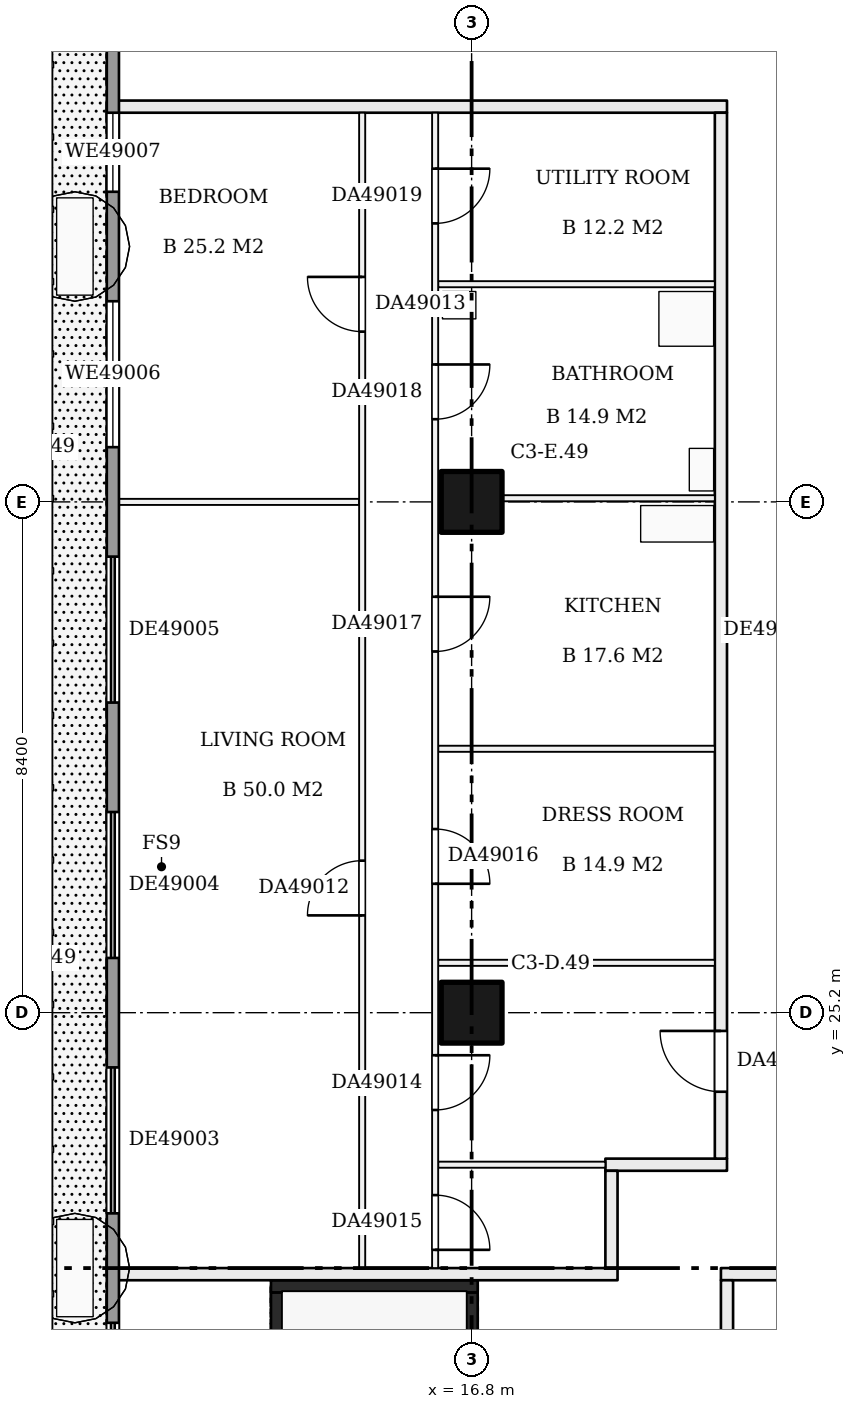
"""IFC4 building model, lengths in metres.
Left out: names, types, materials, properties, quantities, classifications, styles, units other than length and angle.
Written with IfcOpenShell. Run it as: python <this file> out.ifc"""

import sys

from ifc_helpers import new_model, si_unit, direction, frame, frame_2d, origin, origin_2d, place, context, subcontext, project, spatial, rectangle, extrude, element, fill, save


model = new_model("IFC4")
c1 = context("Model", 3, precision=1e-05, world=origin(), true_north=direction((0.0, 1.0)))
c2 = subcontext(c1, "Body", "Model", "MODEL_VIEW")
j1 = project(units=[si_unit("LENGTHUNIT", "METRE"), si_unit("PLANEANGLEUNIT", "RADIAN")], contexts=[c1])
p1 = place(None, origin())
s1 = spatial("IfcSite", under=j1, at=p1, CompositionType="ELEMENT")
p2 = place(p1, origin())
s2 = spatial("IfcBuilding", under=s1, at=p2, CompositionType="ELEMENT")
p3 = place(p2, frame((0.0, 0.0, 189.7)))
s3 = spatial("IfcBuildingStorey", under=s2, at=p3, CompositionType="ELEMENT", Elevation=189.7)
for number, where, z_axis, x_axis in (
    (1, (16.8, 25.2, 0.0), (0.0, 0.0, 1.0), (1.0, 0.0, 0.0)),
    (2, (16.8, 33.6, 0.0), (0.0, 0.0, 1.0), (1.0, 0.0, 0.0)),
):
    element("IfcColumn", number, at=place(p3, frame(where, z_axis=z_axis, x_axis=x_axis)), inside=s3, PredefinedType="COLUMN", context=c2, shape_type="SweptSolid", body=[
        extrude(rectangle(XDim=1.0, YDim=1.0, at=origin_2d()), origin(), (0.0, 0.0, 1.0), 3.22),
    ])
p4 = place(p3, frame((13.6, 13.8, 0.0), z_axis=(0.0, 0.0, 1.0), x_axis=(0.0, 1.0, 0.0)))
e3 = element("IfcWall", 3, at=p4, inside=s3, PredefinedType="SHEAR", context=c2, shape_type="SweptSolid", body=[
    extrude(rectangle(XDim=6.8, YDim=0.2, at=frame_2d((3.4, 0.0))), origin(), (0.0, 0.0, 1.0), 3.22),
])
p5 = place(p3, frame((16.8, 13.8, 0.0), z_axis=(0.0, 0.0, 1.0), x_axis=(0.0, 1.0, 0.0)))
e4 = element("IfcWall", 4, at=p5, inside=s3, PredefinedType="SHEAR", context=c2, shape_type="SweptSolid", body=[
    extrude(rectangle(XDim=6.8, YDim=0.2, at=frame_2d((3.4, 0.0))), origin(), (0.0, 0.0, 1.0), 3.22),
])
p6 = place(p5, frame((0.1, 0.0, 0.0)))
e5 = element("IfcOpeningElement", 5, at=p6, cuts=e4, PredefinedType="OPENING", context=c2, shape_type="SweptSolid", body=[
    extrude(rectangle(XDim=1.0, YDim=2.1, at=frame_2d((0.5, 1.05))), frame((0.0, 0.11, 0.0), z_axis=(0.0, -1.0, 0.0), x_axis=(1.0, 0.0, 0.0)), (0.0, 0.0, 1.0), 0.22),
])
p7 = place(p3, frame((13.5, 20.7, 0.0), z_axis=(0.0, 0.0, 1.0), x_axis=(1.0, 0.0, 0.0)))
e6 = element("IfcWall", 6, at=p7, inside=s3, PredefinedType="SHEAR", context=c2, shape_type="SweptSolid", body=[
    extrude(rectangle(XDim=3.4, YDim=0.2, at=frame_2d((1.7, 0.0))), origin(), (0.0, 0.0, 1.0), 3.22),
])
p8 = place(p3, frame((10.9, 20.9, 0.0), z_axis=(0.0, 0.0, 1.0), x_axis=(1.0, 0.0, 0.0)))
e7 = element("IfcWall", 7, at=p8, inside=s3, PredefinedType="PARTITIONING", context=c2, shape_type="SweptSolid", body=[
    extrude(rectangle(XDim=8.3, YDim=0.2, at=frame_2d((4.15, 0.0))), origin(), (0.0, 0.0, 1.0), 3.22),
])
p9 = place(p3, frame((20.9, 20.9, 0.0), z_axis=(0.0, 0.0, 1.0), x_axis=(1.0, 0.0, 0.0)))
e8 = element("IfcWall", 8, at=p9, inside=s3, PredefinedType="PARTITIONING", context=c2, shape_type="SweptSolid", body=[
    extrude(rectangle(XDim=19.3, YDim=0.2, at=frame_2d((9.65, 0.0))), origin(), (0.0, 0.0, 1.0), 3.22),
])
p10 = place(p9, frame((4.88, 0.0, 0.0)))
e9 = element("IfcOpeningElement", 9, at=p10, cuts=e8, PredefinedType="OPENING", context=c2, shape_type="SweptSolid", body=[
    extrude(rectangle(XDim=1.0, YDim=2.1, at=frame_2d((0.5, 1.05))), frame((0.0, 0.11, 0.0), z_axis=(0.0, -1.0, 0.0), x_axis=(1.0, 0.0, 0.0)), (0.0, 0.0, 1.0), 0.22),
])
p11 = place(p3, frame((16.25, 22.7, 0.0), z_axis=(0.0, 0.0, 1.0), x_axis=(1.0, 0.0, 0.0)))
e10 = element("IfcWall", 10, at=p11, inside=s3, PredefinedType="PARTITIONING", context=c2, shape_type="SweptSolid", body=[
    extrude(rectangle(XDim=2.75, YDim=0.1, at=frame_2d((1.375, 0.0))), origin(), (0.0, 0.0, 1.0), 3.22),
])
p12 = place(p3, frame((19.0, 22.7, 0.0), z_axis=(0.0, 0.0, 1.0), x_axis=(1.0, 0.0, 0.0)))
e11 = element("IfcWall", 11, at=p12, inside=s3, PredefinedType="PARTITIONING", context=c2, shape_type="SweptSolid", body=[
    extrude(rectangle(XDim=2.0, YDim=0.2, at=frame_2d((1.0, 0.0))), origin(), (0.0, 0.0, 1.0), 3.22),
])
for number, where, z_axis, x_axis in (
    (12, (16.25, 26.02, 0.0), (0.0, 0.0, 1.0), (1.0, 0.0, 0.0)),
    (13, (16.25, 29.54, 0.0), (0.0, 0.0, 1.0), (1.0, 0.0, 0.0)),
):
    element("IfcWall", number, at=place(p3, frame(where, z_axis=z_axis, x_axis=x_axis)), inside=s3, PredefinedType="PARTITIONING", context=c2, shape_type="SweptSolid", body=[
        extrude(rectangle(XDim=4.55, YDim=0.1, at=frame_2d((2.275, 0.0))), origin(), (0.0, 0.0, 1.0), 3.22),
    ])
p13 = place(p3, frame((10.9, 33.6, 0.0), z_axis=(0.0, 0.0, 1.0), x_axis=(1.0, 0.0, 0.0)))
e14 = element("IfcWall", 14, at=p13, inside=s3, PredefinedType="PARTITIONING", context=c2, shape_type="SweptSolid", body=[
    extrude(rectangle(XDim=4.05, YDim=0.1, at=frame_2d((2.025, 0.0))), origin(), (0.0, 0.0, 1.0), 3.22),
])
for number, where, z_axis, x_axis in (
    (15, (16.25, 33.66, 0.0), (0.0, 0.0, 1.0), (1.0, 0.0, 0.0)),
    (16, (16.25, 37.18, 0.0), (0.0, 0.0, 1.0), (1.0, 0.0, 0.0)),
):
    element("IfcWall", number, at=place(p3, frame(where, z_axis=z_axis, x_axis=x_axis)), inside=s3, PredefinedType="PARTITIONING", context=c2, shape_type="SweptSolid", body=[
        extrude(rectangle(XDim=4.55, YDim=0.1, at=frame_2d((2.275, 0.0))), origin(), (0.0, 0.0, 1.0), 3.22),
    ])
p14 = place(p3, frame((10.9, 40.1, 0.0), z_axis=(0.0, 0.0, 1.0), x_axis=(1.0, 0.0, 0.0)))
e17 = element("IfcWall", 17, at=p14, inside=s3, PredefinedType="PARTITIONING", context=c2, shape_type="SweptSolid", body=[
    extrude(rectangle(XDim=10.1, YDim=0.2, at=frame_2d((5.05, 0.0))), origin(), (0.0, 0.0, 1.0), 3.22),
])
p15 = place(p3, frame((15.0, 21.0, 0.0), z_axis=(0.0, 0.0, 1.0), x_axis=(0.0, 1.0, 0.0)))
e18 = element("IfcWall", 18, at=p15, inside=s3, PredefinedType="PARTITIONING", context=c2, shape_type="SweptSolid", body=[
    extrude(rectangle(XDim=19.0, YDim=0.1, at=frame_2d((9.5, 0.0))), origin(), (0.0, 0.0, 1.0), 3.22),
])
p16 = place(p15, frame((5.8, 0.0, 0.0)))
e19 = element("IfcOpeningElement", 19, at=p16, cuts=e18, PredefinedType="OPENING", context=c2, shape_type="SweptSolid", body=[
    extrude(rectangle(XDim=0.9, YDim=2.1, at=frame_2d((0.45, 1.05))), frame((0.0, 0.06, 0.0), z_axis=(0.0, -1.0, 0.0), x_axis=(1.0, 0.0, 0.0)), (0.0, 0.0, 1.0), 0.12),
])
p17 = place(p15, frame((15.4, 0.0, 0.0)))
e20 = element("IfcOpeningElement", 20, at=p17, cuts=e18, PredefinedType="OPENING", context=c2, shape_type="SweptSolid", body=[
    extrude(rectangle(XDim=0.9, YDim=2.1, at=frame_2d((0.45, 1.05))), frame((0.0, 0.06, 0.0), z_axis=(0.0, -1.0, 0.0), x_axis=(1.0, 0.0, 0.0)), (0.0, 0.0, 1.0), 0.12),
])
p18 = place(p3, frame((16.2, 21.0, 0.0), z_axis=(0.0, 0.0, 1.0), x_axis=(0.0, 1.0, 0.0)))
e21 = element("IfcWall", 21, at=p18, inside=s3, PredefinedType="PARTITIONING", context=c2, shape_type="SweptSolid", body=[
    extrude(rectangle(XDim=19.0, YDim=0.1, at=frame_2d((9.5, 0.0))), origin(), (0.0, 0.0, 1.0), 3.22),
])
p19 = place(p18, frame((2.6, 0.0, 0.0)))
e22 = element("IfcOpeningElement", 22, at=p19, cuts=e21, PredefinedType="OPENING", context=c2, shape_type="SweptSolid", body=[
    extrude(rectangle(XDim=0.9, YDim=2.1, at=frame_2d((0.45, 1.05))), frame((0.0, 0.06, 0.0), z_axis=(0.0, -1.0, 0.0), x_axis=(1.0, 0.0, 0.0)), (0.0, 0.0, 1.0), 0.12),
])
p20 = place(p18, frame((0.3, 0.0, 0.0)))
e23 = element("IfcOpeningElement", 23, at=p20, cuts=e21, PredefinedType="OPENING", context=c2, shape_type="SweptSolid", body=[
    extrude(rectangle(XDim=0.9, YDim=2.1, at=frame_2d((0.45, 1.05))), frame((0.0, 0.06, 0.0), z_axis=(0.0, -1.0, 0.0), x_axis=(1.0, 0.0, 0.0)), (0.0, 0.0, 1.0), 0.12),
])
p21 = place(p18, frame((6.32, 0.0, 0.0)))
e24 = element("IfcOpeningElement", 24, at=p21, cuts=e21, PredefinedType="OPENING", context=c2, shape_type="SweptSolid", body=[
    extrude(rectangle(XDim=0.9, YDim=2.1, at=frame_2d((0.45, 1.05))), frame((0.0, 0.06, 0.0), z_axis=(0.0, -1.0, 0.0), x_axis=(1.0, 0.0, 0.0)), (0.0, 0.0, 1.0), 0.12),
])
p22 = place(p18, frame((10.14, 0.0, 0.0)))
e25 = element("IfcOpeningElement", 25, at=p22, cuts=e21, PredefinedType="OPENING", context=c2, shape_type="SweptSolid", body=[
    extrude(rectangle(XDim=0.9, YDim=2.1, at=frame_2d((0.45, 1.05))), frame((0.0, 0.06, 0.0), z_axis=(0.0, -1.0, 0.0), x_axis=(1.0, 0.0, 0.0)), (0.0, 0.0, 1.0), 0.12),
])
p23 = place(p18, frame((13.96, 0.0, 0.0)))
e26 = element("IfcOpeningElement", 26, at=p23, cuts=e21, PredefinedType="OPENING", context=c2, shape_type="SweptSolid", body=[
    extrude(rectangle(XDim=0.9, YDim=2.1, at=frame_2d((0.45, 1.05))), frame((0.0, 0.06, 0.0), z_axis=(0.0, -1.0, 0.0), x_axis=(1.0, 0.0, 0.0)), (0.0, 0.0, 1.0), 0.12),
])
p24 = place(p18, frame((17.18, 0.0, 0.0)))
e27 = element("IfcOpeningElement", 27, at=p24, cuts=e21, PredefinedType="OPENING", context=c2, shape_type="SweptSolid", body=[
    extrude(rectangle(XDim=0.9, YDim=2.1, at=frame_2d((0.45, 1.05))), frame((0.0, 0.06, 0.0), z_axis=(0.0, -1.0, 0.0), x_axis=(1.0, 0.0, 0.0)), (0.0, 0.0, 1.0), 0.12),
])
p25 = place(p3, frame((19.1, 21.0, 0.0), z_axis=(0.0, 0.0, 1.0), x_axis=(0.0, 1.0, 0.0)))
e28 = element("IfcWall", 28, at=p25, inside=s3, PredefinedType="PARTITIONING", context=c2, shape_type="SweptSolid", body=[
    extrude(rectangle(XDim=1.6, YDim=0.2, at=frame_2d((0.8, 0.0))), origin(), (0.0, 0.0, 1.0), 3.22),
])
p26 = place(p3, frame((20.9, 22.8, 0.0), z_axis=(0.0, 0.0, 1.0), x_axis=(0.0, 1.0, 0.0)))
e29 = element("IfcWall", 29, at=p26, inside=s3, PredefinedType="PARTITIONING", context=c2, shape_type="SweptSolid", body=[
    extrude(rectangle(XDim=17.2, YDim=0.2, at=frame_2d((8.6, 0.0))), origin(), (0.0, 0.0, 1.0), 3.22),
])
p27 = place(p26, frame((1.1, 0.0, 0.0)))
e30 = element("IfcOpeningElement", 30, at=p27, cuts=e29, PredefinedType="OPENING", context=c2, shape_type="SweptSolid", body=[
    extrude(rectangle(XDim=1.0, YDim=2.1, at=frame_2d((0.5, 1.05))), frame((0.0, 0.11, 0.0), z_axis=(0.0, -1.0, 0.0), x_axis=(1.0, 0.0, 0.0)), (0.0, 0.0, 1.0), 0.22),
])
p28 = place(p3, frame((21.0, 13.7, 0.0), z_axis=(0.0, 0.0, 1.0), x_axis=(0.0, 1.0, 0.0)))
e31 = element("IfcWall", 31, at=p28, inside=s3, PredefinedType="PARTITIONING", context=c2, shape_type="SweptSolid", body=[
    extrude(rectangle(XDim=7.1, YDim=0.2, at=frame_2d((3.55, 0.0))), origin(), (0.0, 0.0, 1.0), 3.22),
])
p29 = place(p3, frame((10.9, 42.0, 0.0), z_axis=(0.0, 0.0, 1.0), x_axis=(0.0, -1.0, 0.0)))
e32 = element("IfcWall", 32, at=p29, inside=s3, PredefinedType="SOLIDWALL", context=c2, shape_type="SweptSolid", body=[
    extrude(rectangle(XDim=28.6, YDim=0.2, at=frame_2d((14.3, 0.0))), origin(), (0.0, 0.0, 1.0), 3.22),
])
p30 = place(p29, frame((25.9, 0.0, 0.0)))
e33 = element("IfcOpeningElement", 33, at=p30, cuts=e32, PredefinedType="OPENING", context=c2, shape_type="SweptSolid", body=[
    extrude(rectangle(XDim=2.4, YDim=2.2, at=frame_2d((1.2, 1.1))), frame((0.0, 0.11, 0.0), z_axis=(0.0, -1.0, 0.0), x_axis=(1.0, 0.0, 0.0)), (0.0, 0.0, 1.0), 0.22),
])
p31 = place(p29, frame((21.9, 0.0, 0.0)))
e34 = element("IfcOpeningElement", 34, at=p31, cuts=e32, PredefinedType="OPENING", context=c2, shape_type="SweptSolid", body=[
    extrude(rectangle(XDim=2.4, YDim=2.2, at=frame_2d((1.2, 1.1))), frame((0.0, 0.11, 0.0), z_axis=(0.0, -1.0, 0.0), x_axis=(1.0, 0.0, 0.0)), (0.0, 0.0, 1.0), 0.22),
])
p32 = place(p29, frame((17.7, 0.0, 0.0)))
e35 = element("IfcOpeningElement", 35, at=p32, cuts=e32, PredefinedType="OPENING", context=c2, shape_type="SweptSolid", body=[
    extrude(rectangle(XDim=2.4, YDim=2.2, at=frame_2d((1.2, 1.1))), frame((0.0, 0.11, 0.0), z_axis=(0.0, -1.0, 0.0), x_axis=(1.0, 0.0, 0.0)), (0.0, 0.0, 1.0), 0.22),
])
p33 = place(p29, frame((13.5, 0.0, 0.0)))
e36 = element("IfcOpeningElement", 36, at=p33, cuts=e32, PredefinedType="OPENING", context=c2, shape_type="SweptSolid", body=[
    extrude(rectangle(XDim=2.4, YDim=2.2, at=frame_2d((1.2, 1.1))), frame((0.0, 0.11, 0.0), z_axis=(0.0, -1.0, 0.0), x_axis=(1.0, 0.0, 0.0)), (0.0, 0.0, 1.0), 0.22),
])
p34 = place(p29, frame((9.3, 0.0, 0.0)))
e37 = element("IfcOpeningElement", 37, at=p34, cuts=e32, PredefinedType="OPENING", context=c2, shape_type="SweptSolid", body=[
    extrude(rectangle(XDim=2.4, YDim=2.2, at=frame_2d((1.2, 1.1))), frame((0.0, 0.11, 0.0), z_axis=(0.0, -1.0, 0.0), x_axis=(1.0, 0.0, 0.0)), (0.0, 0.0, 1.0), 0.22),
])
p35 = place(p29, frame((5.1, 0.0, 0.9)))
e38 = element("IfcOpeningElement", 38, at=p35, cuts=e32, PredefinedType="OPENING", context=c2, shape_type="SweptSolid", body=[
    extrude(rectangle(XDim=2.4, YDim=1.5, at=frame_2d((1.2, 0.75))), frame((0.0, 0.11, 0.0), z_axis=(0.0, -1.0, 0.0), x_axis=(1.0, 0.0, 0.0)), (0.0, 0.0, 1.0), 0.22),
])
p36 = place(p29, frame((2.0, 0.0, 0.9)))
e39 = element("IfcOpeningElement", 39, at=p36, cuts=e32, PredefinedType="OPENING", context=c2, shape_type="SweptSolid", body=[
    extrude(rectangle(XDim=1.3, YDim=1.5, at=frame_2d((0.65, 0.75))), frame((0.0, 0.11, 0.0), z_axis=(0.0, -1.0, 0.0), x_axis=(1.0, 0.0, 0.0)), (0.0, 0.0, 1.0), 0.22),
])
p37 = place(p16, origin())
e40 = element("IfcDoor", 40, at=p37, inside=s3, OperationType="SINGLE_SWING_LEFT", PredefinedType="DOOR", context=c2, shape_type="SweptSolid", body=[
    extrude(rectangle(XDim=0.9, YDim=2.1, at=frame_2d((0.45, 1.05))), frame((0.0, 0.025, 0.0), z_axis=(0.0, -1.0, 0.0), x_axis=(1.0, 0.0, 0.0)), (0.0, 0.0, 1.0), 0.05),
])
fill(e19, e40)
p38 = place(p17, origin())
e41 = element("IfcDoor", 41, at=p38, inside=s3, OperationType="SINGLE_SWING_RIGHT", PredefinedType="DOOR", context=c2, shape_type="SweptSolid", body=[
    extrude(rectangle(XDim=0.9, YDim=2.1, at=frame_2d((0.45, 1.05))), frame((0.0, 0.025, 0.0), z_axis=(0.0, -1.0, 0.0), x_axis=(1.0, 0.0, 0.0)), (0.0, 0.0, 1.0), 0.05),
])
fill(e20, e41)
p39 = place(p19, frame((0.9, 0.0, 0.0), z_axis=(0.0, 0.0, 1.0), x_axis=(-1.0, 0.0, 0.0)))
e42 = element("IfcDoor", 42, at=p39, inside=s3, OperationType="SINGLE_SWING_LEFT", PredefinedType="DOOR", context=c2, shape_type="SweptSolid", body=[
    extrude(rectangle(XDim=0.9, YDim=2.1, at=frame_2d((0.45, 1.05))), frame((0.0, 0.025, 0.0), z_axis=(0.0, -1.0, 0.0), x_axis=(1.0, 0.0, 0.0)), (0.0, 0.0, 1.0), 0.05),
])
fill(e22, e42)
p40 = place(p20, frame((0.9, 0.0, 0.0), z_axis=(0.0, 0.0, 1.0), x_axis=(-1.0, 0.0, 0.0)))
e43 = element("IfcDoor", 43, at=p40, inside=s3, OperationType="SINGLE_SWING_RIGHT", PredefinedType="DOOR", context=c2, shape_type="SweptSolid", body=[
    extrude(rectangle(XDim=0.9, YDim=2.1, at=frame_2d((0.45, 1.05))), frame((0.0, 0.025, 0.0), z_axis=(0.0, -1.0, 0.0), x_axis=(1.0, 0.0, 0.0)), (0.0, 0.0, 1.0), 0.05),
])
fill(e23, e43)
p41 = place(p21, frame((0.9, 0.0, 0.0), z_axis=(0.0, 0.0, 1.0), x_axis=(-1.0, 0.0, 0.0)))
e44 = element("IfcDoor", 44, at=p41, inside=s3, OperationType="SINGLE_SWING_RIGHT", PredefinedType="DOOR", context=c2, shape_type="SweptSolid", body=[
    extrude(rectangle(XDim=0.9, YDim=2.1, at=frame_2d((0.45, 1.05))), frame((0.0, 0.025, 0.0), z_axis=(0.0, -1.0, 0.0), x_axis=(1.0, 0.0, 0.0)), (0.0, 0.0, 1.0), 0.05),
])
fill(e24, e44)
p42 = place(p22, frame((0.9, 0.0, 0.0), z_axis=(0.0, 0.0, 1.0), x_axis=(-1.0, 0.0, 0.0)))
e45 = element("IfcDoor", 45, at=p42, inside=s3, OperationType="SINGLE_SWING_LEFT", PredefinedType="DOOR", context=c2, shape_type="SweptSolid", body=[
    extrude(rectangle(XDim=0.9, YDim=2.1, at=frame_2d((0.45, 1.05))), frame((0.0, 0.025, 0.0), z_axis=(0.0, -1.0, 0.0), x_axis=(1.0, 0.0, 0.0)), (0.0, 0.0, 1.0), 0.05),
])
fill(e25, e45)
p43 = place(p23, frame((0.9, 0.0, 0.0), z_axis=(0.0, 0.0, 1.0), x_axis=(-1.0, 0.0, 0.0)))
e46 = element("IfcDoor", 46, at=p43, inside=s3, OperationType="SINGLE_SWING_LEFT", PredefinedType="DOOR", context=c2, shape_type="SweptSolid", body=[
    extrude(rectangle(XDim=0.9, YDim=2.1, at=frame_2d((0.45, 1.05))), frame((0.0, 0.025, 0.0), z_axis=(0.0, -1.0, 0.0), x_axis=(1.0, 0.0, 0.0)), (0.0, 0.0, 1.0), 0.05),
])
fill(e26, e46)
p44 = place(p24, frame((0.9, 0.0, 0.0), z_axis=(0.0, 0.0, 1.0), x_axis=(-1.0, 0.0, 0.0)))
e47 = element("IfcDoor", 47, at=p44, inside=s3, OperationType="SINGLE_SWING_LEFT", PredefinedType="DOOR", context=c2, shape_type="SweptSolid", body=[
    extrude(rectangle(XDim=0.9, YDim=2.1, at=frame_2d((0.45, 1.05))), frame((0.0, 0.025, 0.0), z_axis=(0.0, -1.0, 0.0), x_axis=(1.0, 0.0, 0.0)), (0.0, 0.0, 1.0), 0.05),
])
fill(e27, e47)
p45 = place(p27, origin())
e48 = element("IfcDoor", 48, at=p45, inside=s3, OperationType="SINGLE_SWING_RIGHT", PredefinedType="DOOR", context=c2, shape_type="SweptSolid", body=[
    extrude(rectangle(XDim=1.0, YDim=2.1, at=frame_2d((0.5, 1.05))), frame((0.0, 0.025, 0.0), z_axis=(0.0, -1.0, 0.0), x_axis=(1.0, 0.0, 0.0)), (0.0, 0.0, 1.0), 0.05),
])
fill(e30, e48)
p46 = place(p31, origin())
e49 = element("IfcDoor", 49, at=p46, inside=s3, OperationType="DOUBLE_DOOR_SLIDING", PredefinedType="DOOR", context=c2, shape_type="SweptSolid", body=[
    extrude(rectangle(XDim=2.4, YDim=2.2, at=frame_2d((1.2, 1.1))), frame((0.0, 0.025, 0.0), z_axis=(0.0, -1.0, 0.0), x_axis=(1.0, 0.0, 0.0)), (0.0, 0.0, 1.0), 0.05),
])
fill(e34, e49)
p47 = place(p32, origin())
e50 = element("IfcDoor", 50, at=p47, inside=s3, OperationType="DOUBLE_DOOR_SLIDING", PredefinedType="DOOR", context=c2, shape_type="SweptSolid", body=[
    extrude(rectangle(XDim=2.4, YDim=2.2, at=frame_2d((1.2, 1.1))), frame((0.0, 0.025, 0.0), z_axis=(0.0, -1.0, 0.0), x_axis=(1.0, 0.0, 0.0)), (0.0, 0.0, 1.0), 0.05),
])
fill(e35, e50)
p48 = place(p33, origin())
e51 = element("IfcDoor", 51, at=p48, inside=s3, OperationType="DOUBLE_DOOR_SLIDING", PredefinedType="DOOR", context=c2, shape_type="SweptSolid", body=[
    extrude(rectangle(XDim=2.4, YDim=2.2, at=frame_2d((1.2, 1.1))), frame((0.0, 0.025, 0.0), z_axis=(0.0, -1.0, 0.0), x_axis=(1.0, 0.0, 0.0)), (0.0, 0.0, 1.0), 0.05),
])
fill(e36, e51)
p49 = place(p34, origin())
e52 = element("IfcDoor", 52, at=p49, inside=s3, OperationType="DOUBLE_DOOR_SLIDING", PredefinedType="DOOR", context=c2, shape_type="SweptSolid", body=[
    extrude(rectangle(XDim=2.4, YDim=2.2, at=frame_2d((1.2, 1.1))), frame((0.0, 0.025, 0.0), z_axis=(0.0, -1.0, 0.0), x_axis=(1.0, 0.0, 0.0)), (0.0, 0.0, 1.0), 0.05),
])
fill(e37, e52)
p50 = place(p35, origin())
e53 = element("IfcWindow", 53, at=p50, inside=s3, PartitioningType="SINGLE_PANEL", PredefinedType="WINDOW", context=c2, shape_type="SweptSolid", body=[
    extrude(rectangle(XDim=2.4, YDim=1.5, at=frame_2d((1.2, 0.75))), frame((0.0, 0.03, 0.0), z_axis=(0.0, -1.0, 0.0), x_axis=(1.0, 0.0, 0.0)), (0.0, 0.0, 1.0), 0.06),
])
fill(e38, e53)
p51 = place(p36, origin())
e54 = element("IfcWindow", 54, at=p51, inside=s3, PartitioningType="SINGLE_PANEL", PredefinedType="WINDOW", context=c2, shape_type="SweptSolid", body=[
    extrude(rectangle(XDim=1.3, YDim=1.5, at=frame_2d((0.65, 0.75))), frame((0.0, 0.03, 0.0), z_axis=(0.0, -1.0, 0.0), x_axis=(1.0, 0.0, 0.0)), (0.0, 0.0, 1.0), 0.06),
])
fill(e39, e54)
save(model, sys.argv[1])
